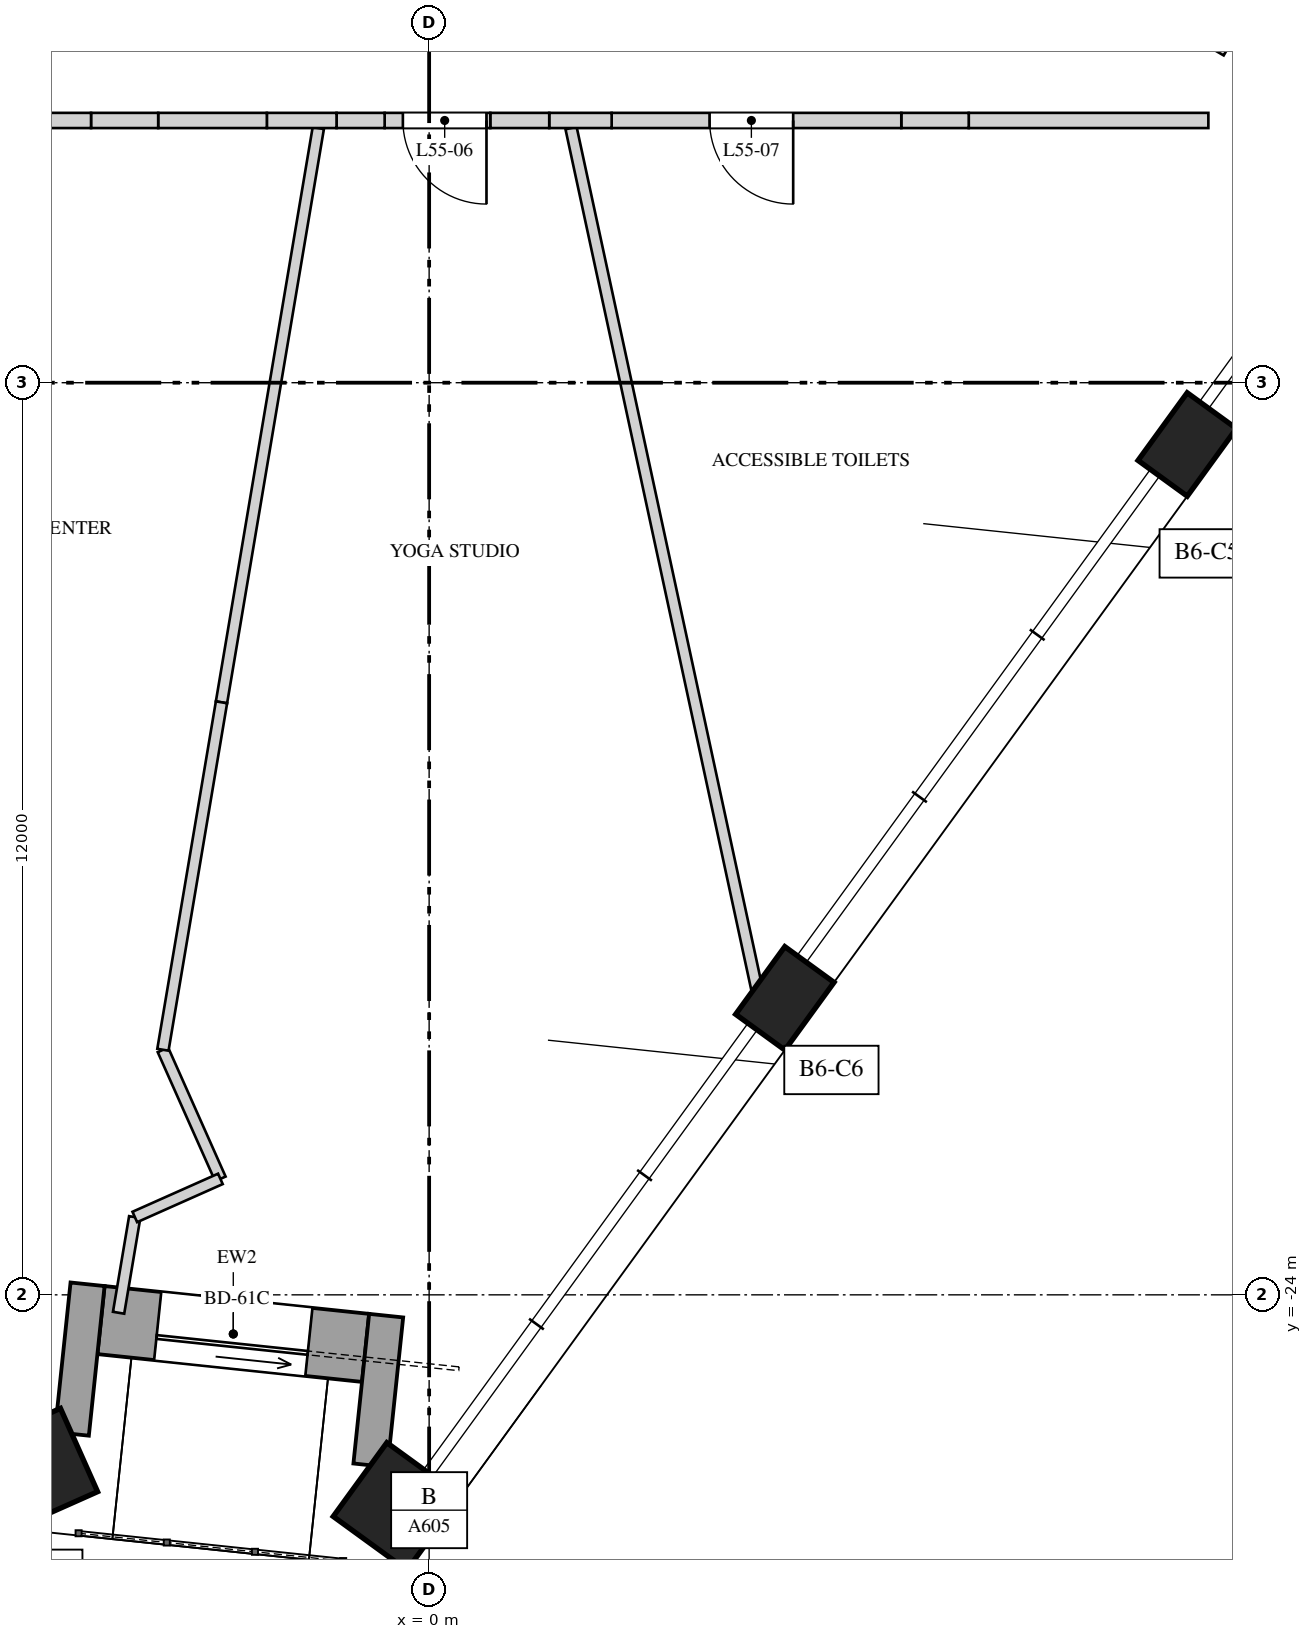
"""IFC4 building model, lengths in metres.
Left out: names, types, materials, properties, quantities, classifications, styles, units other than length and angle.
Written with IfcOpenShell. Run it as: python <this file> out.ifc"""

import sys

from ifc_helpers import new_model, si_unit, direction, frame, frame_2d, origin, origin_2d, place, context, subcontext, project, spatial, polyline, rectangle, outline, extrude, element, fill, save


model = new_model("IFC4")
c1 = context("Model", 3, precision=1e-05, world=origin(), true_north=direction((0.0, 1.0)))
c2 = subcontext(c1, "Body", "Model", "MODEL_VIEW")
j1 = project(units=[si_unit("LENGTHUNIT", "METRE"), si_unit("PLANEANGLEUNIT", "RADIAN")], contexts=[c1])
p1 = place(None, origin())
s1 = spatial("IfcSite", under=j1, at=p1, CompositionType="ELEMENT")
p2 = place(p1, origin())
s2 = spatial("IfcBuilding", under=s1, at=p2, CompositionType="ELEMENT")
p3 = place(p2, frame((0.0, 0.0, 237.2)))
s3 = spatial("IfcBuildingStorey", under=s2, at=p3, CompositionType="ELEMENT", Elevation=237.2)
for number, where, z_axis, x_axis in (
    (1, (-5.154, -26.286, -0.35), (0.0, 0.0, 1.0), (0.407, -0.914, 0.0)),
    (2, (-0.423, -26.783, -0.35), (0.0, 0.0, 1.0), (0.588, 0.809, 0.0)),
):
    element("IfcColumn", number, at=place(p3, frame(where, z_axis=z_axis, x_axis=x_axis)), inside=s3, PredefinedType="COLUMN", context=c2, shape_type="SweptSolid", body=[
        extrude(rectangle(XDim=1.2, YDim=1.2, at=origin_2d()), origin(), (0.0, 0.0, 1.0), 4.35),
    ])
for number, where, z_axis, x_axis in (
    (3, (4.68, -20.099, -0.35), (0.0, 0.0, 1.0), (0.588, 0.809, 0.0)),
    (4, (9.974, -12.813, -0.35), (0.0, 0.0, 1.0), (0.588, 0.809, 0.0)),
):
    element("IfcColumn", number, at=place(p3, frame(where, z_axis=z_axis, x_axis=x_axis)), inside=s3, PredefinedType="COLUMN", context=c2, shape_type="SweptSolid", body=[
        extrude(rectangle(XDim=1.1, YDim=0.8, at=origin_2d()), origin(), (0.0, 0.0, 1.0), 4.35),
    ])
p4 = place(p3, frame((-0.836, -24.698, 0.0), z_axis=(0.0, 0.0, 1.0), x_axis=(-0.994518821828, 0.104557701916, 0.0)))
e5 = element("IfcWall", 5, at=p4, inside=s3, PredefinedType="SOLIDWALL", context=c2, shape_type="SweptSolid", body=[
    extrude(rectangle(XDim=3.5, YDim=0.9, at=frame_2d((1.75, 0.0))), origin(), (0.0, 0.0, 1.0), 3.3),
])
p5 = place(p4, frame((0.75, 0.0, 0.0)))
e6 = element("IfcOpeningElement", 6, at=p5, cuts=e5, PredefinedType="OPENING", context=c2, shape_type="SweptSolid", body=[
    extrude(rectangle(XDim=2.0, YDim=2.4, at=frame_2d((1.0, 1.2))), frame((0.0, 0.46, 0.0), z_axis=(0.0, -1.0, 0.0), x_axis=(1.0, 0.0, 0.0)), (0.0, 0.0, 1.0), 0.92),
])
for number, where, z_axis, x_axis in (
    (7, (-0.772, -26.242, 0.0), (0.0, 0.0, 1.0), (0.104, 0.995, 0.0)),
    (8, (-4.701, -25.829, 0.0), (0.0, 0.0, 1.0), (0.105, 0.995, 0.0)),
):
    element("IfcWall", number, at=place(p3, frame(where, z_axis=z_axis, x_axis=x_axis)), inside=s3, PredefinedType="SOLIDWALL", context=c2, shape_type="SweptSolid", body=[
        extrude(rectangle(XDim=1.979, YDim=0.45, at=frame_2d((0.99, 0.0))), origin(), (0.0, 0.0, 1.0), 2.55),
    ])
p6 = place(p3, frame((-3.873, -22.977, 0.0), z_axis=(0.0, 0.0, 1.0), x_axis=(-0.166260221615, -0.986081912778, 0.0)))
e9 = element("IfcWall", 9, at=p6, inside=s3, PredefinedType="PARTITIONING", context=c2, shape_type="SweptSolid", body=[
    extrude(rectangle(XDim=1.276, YDim=0.15, at=frame_2d((0.638, 0.0))), origin(), (0.0, 0.0, 1.0), 3.65),
])
p7 = place(p3, frame((-3.502, -20.777, 0.0), z_axis=(0.0, 0.0, 1.0), x_axis=(0.40677227382, -0.913529592981, 0.0)))
e10 = element("IfcWall", 10, at=p7, inside=s3, PredefinedType="PARTITIONING", context=c2, shape_type="SweptSolid", body=[
    extrude(rectangle(XDim=1.858, YDim=0.15, at=frame_2d((0.929, 0.0))), origin(), (0.0, 0.0, 1.0), 3.65),
])
p8 = place(p3, frame((-2.746, -22.474, 0.0), z_axis=(0.0, 0.0, 1.0), x_axis=(-0.913500903341, -0.406836698929, 0.0)))
e11 = element("IfcWall", 11, at=p8, inside=s3, PredefinedType="PARTITIONING", context=c2, shape_type="SweptSolid", body=[
    extrude(rectangle(XDim=1.233, YDim=0.15, at=frame_2d((0.616, 0.0))), origin(), (0.0, 0.0, 1.0), 3.65),
])
p9 = place(p3, frame((-1.458, -8.65, 0.0), z_axis=(0.0, 0.0, 1.0), x_axis=(-0.166222927691, -0.986088200066, 0.0)))
e12 = element("IfcWall", 12, at=p9, inside=s3, PredefinedType="PARTITIONING", context=c2, shape_type="SweptSolid", body=[
    extrude(rectangle(XDim=7.661, YDim=0.15, at=frame_2d((3.831, 0.0))), origin(), (0.0, 0.0, 1.0), 2.55),
])
p10 = place(p3, frame((-2.732, -16.205, 0.0), z_axis=(0.0, 0.0, 1.0), x_axis=(-0.166217863251, -0.986089053755, 0.0)))
e13 = element("IfcWall", 13, at=p10, inside=s3, PredefinedType="PARTITIONING", context=c2, shape_type="SweptSolid", body=[
    extrude(rectangle(XDim=4.635, YDim=0.15, at=frame_2d((2.318, 0.0))), origin(), (0.0, 0.0, 1.0), 3.65),
])
p11 = place(p3, frame((1.867, -8.65, 0.0), z_axis=(0.0, 0.0, 1.0), x_axis=(0.211008418271, -0.977484244077, 0.0)))
e14 = element("IfcWall", 14, at=p11, inside=s3, PredefinedType="PARTITIONING", context=c2, shape_type="SweptSolid", body=[
    extrude(rectangle(XDim=11.855, YDim=0.15, at=frame_2d((5.927, 0.0))), origin(), (0.0, 0.0, 1.0), 2.75),
])
p12 = place(p3, frame((12.048, -4.733, 0.0), z_axis=(0.0, 0.0, 1.0), x_axis=(-0.500005339912, -0.866022320763, 0.0)))
e15 = element("IfcWall", 15, at=p12, inside=s3, PredefinedType="SOLIDWALL", context=c2, shape_type="SweptSolid", body=[
    extrude(rectangle(XDim=3.362, YDim=0.2, at=frame_2d((1.681, 0.0))), origin(), (0.0, 0.0, 1.0), 3.65),
])
p13 = place(p3, frame((10.252, -8.55, 0.0), z_axis=(0.0, 0.0, 1.0), x_axis=(-1.0, 0.0, 0.0)))
e16 = element("IfcWall", 16, at=p13, inside=s3, PredefinedType="SOLIDWALL", context=c2, shape_type="SweptSolid", body=[
    extrude(rectangle(XDim=3.153, YDim=0.2, at=frame_2d((1.576, 0.0))), origin(), (0.0, 0.0, 1.0), 3.65),
])
p14 = place(p3, frame((7.099, -8.55, 0.0), z_axis=(0.0, 0.0, 1.0), x_axis=(-1.0, 0.0, 0.0)))
e17 = element("IfcWall", 17, at=p14, inside=s3, PredefinedType="SOLIDWALL", context=c2, shape_type="SweptSolid", body=[
    extrude(rectangle(XDim=0.887, YDim=0.2, at=frame_2d((0.444, 0.0))), origin(), (0.0, 0.0, 1.0), 2.95),
])
p15 = place(p3, frame((6.212, -8.55, 0.0), z_axis=(0.0, 0.0, 1.0), x_axis=(-1.0, 0.0, 0.0)))
e18 = element("IfcWall", 18, at=p15, inside=s3, PredefinedType="SOLIDWALL", context=c2, shape_type="SweptSolid", body=[
    extrude(rectangle(XDim=3.811, YDim=0.2, at=frame_2d((1.905, 0.0))), origin(), (0.0, 0.0, 1.0), 3.65),
])
p16 = place(p15, frame((1.423, 0.0, 0.0)))
e19 = element("IfcOpeningElement", 19, at=p16, cuts=e18, PredefinedType="OPENING", context=c2, shape_type="SweptSolid", body=[
    extrude(rectangle(XDim=1.1, YDim=2.4, at=frame_2d((0.55, 1.2))), frame((0.0, 0.11, 0.0), z_axis=(0.0, -1.0, 0.0), x_axis=(1.0, 0.0, 0.0)), (0.0, 0.0, 1.0), 0.22),
])
p17 = place(p3, frame((2.401, -8.55, 0.0), z_axis=(0.0, 0.0, 1.0), x_axis=(-1.0, 0.0, 0.0)))
e20 = element("IfcWall", 20, at=p17, inside=s3, PredefinedType="SOLIDWALL", context=c2, shape_type="SweptSolid", body=[
    extrude(rectangle(XDim=0.821, YDim=0.2, at=frame_2d((0.411, 0.0))), origin(), (0.0, 0.0, 1.0), 2.75),
])
p18 = place(p3, frame((1.58, -8.55, 0.0), z_axis=(0.0, 0.0, 1.0), x_axis=(-1.0, 0.0, 0.0)))
e21 = element("IfcWall", 21, at=p18, inside=s3, PredefinedType="SOLIDWALL", context=c2, shape_type="SweptSolid", body=[
    extrude(rectangle(XDim=0.776, YDim=0.2, at=frame_2d((0.388, 0.0))), origin(), (0.0, 0.0, 1.0), 3.65),
])
p19 = place(p3, frame((0.804, -8.55, 0.0), z_axis=(0.0, 0.0, 1.0), x_axis=(-1.0, 0.0, 0.0)))
e22 = element("IfcWall", 22, at=p19, inside=s3, PredefinedType="SOLIDWALL", context=c2, shape_type="SweptSolid", body=[
    extrude(outline(polyline([(0.0, 0.0), (1.39, 0.0), (1.39, 2.55), (0.49, 2.55), (0.49, 3.65), (0.0, 3.65), (0.0, 0.0)])), frame((0.0, 0.1, 0.0), z_axis=(0.0, -1.0, 0.0), x_axis=(1.0, 0.0, 0.0)), (0.0, 0.0, 1.0), 0.2),
])
p20 = place(p19, frame((0.05, 0.0, 0.0)))
e23 = element("IfcOpeningElement", 23, at=p20, cuts=e22, PredefinedType="OPENING", context=c2, shape_type="SweptSolid", body=[
    extrude(rectangle(XDim=1.1, YDim=2.4, at=frame_2d((0.55, 1.2))), frame((0.0, 0.11, 0.0), z_axis=(0.0, -1.0, 0.0), x_axis=(1.0, 0.0, 0.0)), (0.0, 0.0, 1.0), 0.22),
])
p21 = place(p3, frame((-0.585, -8.55, 0.0), z_axis=(0.0, 0.0, 1.0), x_axis=(-1.0, 0.0, 0.0)))
e24 = element("IfcWall", 24, at=p21, inside=s3, PredefinedType="SOLIDWALL", context=c2, shape_type="SweptSolid", body=[
    extrude(rectangle(XDim=0.633, YDim=0.2, at=frame_2d((0.316, 0.0))), origin(), (0.0, 0.0, 1.0), 3.65),
])
p22 = place(p3, frame((-1.218, -8.55, 0.0), z_axis=(0.0, 0.0, 1.0), x_axis=(-1.0, 0.0, 0.0)))
e25 = element("IfcWall", 25, at=p22, inside=s3, PredefinedType="SOLIDWALL", context=c2, shape_type="SweptSolid", body=[
    extrude(rectangle(XDim=0.917, YDim=0.2, at=frame_2d((0.458, 0.0))), origin(), (0.0, 0.0, 1.0), 2.55),
])
p23 = place(p3, frame((-2.135, -8.55, 0.0), z_axis=(0.0, 0.0, 1.0), x_axis=(-1.0, 0.0, 0.0)))
e26 = element("IfcWall", 26, at=p23, inside=s3, PredefinedType="SOLIDWALL", context=c2, shape_type="SweptSolid", body=[
    extrude(rectangle(XDim=1.43, YDim=0.2, at=frame_2d((0.715, 0.0))), origin(), (0.0, 0.0, 1.0), 3.65),
])
p24 = place(p3, frame((-3.565, -8.55, 0.0), z_axis=(0.0, 0.0, 1.0), x_axis=(-1.0, 0.0, 0.0)))
e27 = element("IfcWall", 27, at=p24, inside=s3, PredefinedType="SOLIDWALL", context=c2, shape_type="SweptSolid", body=[
    extrude(rectangle(XDim=0.883, YDim=0.2, at=frame_2d((0.442, 0.0))), origin(), (0.0, 0.0, 1.0), 2.75),
])
p25 = place(p3, frame((-4.448, -8.55, 0.0), z_axis=(0.0, 0.0, 1.0), x_axis=(-1.0, 0.0, 0.0)))
e28 = element("IfcWall", 28, at=p25, inside=s3, PredefinedType="SOLIDWALL", context=c2, shape_type="SweptSolid", body=[
    extrude(rectangle(XDim=5.161, YDim=0.2, at=frame_2d((2.581, 0.0))), origin(), (0.0, 0.0, 1.0), 3.65),
])
p26 = place(p25, frame((0.572, 0.0, 0.0)))
e29 = element("IfcOpeningElement", 29, at=p26, cuts=e28, PredefinedType="OPENING", context=c2, shape_type="SweptSolid", body=[
    extrude(rectangle(XDim=1.1, YDim=2.4, at=frame_2d((0.55, 1.2))), frame((0.0, 0.11, 0.0), z_axis=(0.0, -1.0, 0.0), x_axis=(1.0, 0.0, 0.0)), (0.0, 0.0, 1.0), 0.22),
])
p27 = place(p5, origin())
e30 = element("IfcDoor", 30, at=p27, inside=s3, OperationType="SLIDING_TO_LEFT", PredefinedType="DOOR", context=c2, shape_type="SweptSolid", body=[
    extrude(rectangle(XDim=2.0, YDim=2.4, at=frame_2d((1.0, 1.2))), frame((0.0, 0.025, 0.0), z_axis=(0.0, -1.0, 0.0), x_axis=(1.0, 0.0, 0.0)), (0.0, 0.0, 1.0), 0.05),
])
fill(e6, e30)
p28 = place(p20, origin())
e31 = element("IfcDoor", 31, at=p28, inside=s3, OperationType="SINGLE_SWING_RIGHT", PredefinedType="DOOR", context=c2, shape_type="SweptSolid", body=[
    extrude(rectangle(XDim=1.1, YDim=2.4, at=frame_2d((0.55, 1.2))), frame((0.0, 0.025, 0.0), z_axis=(0.0, -1.0, 0.0), x_axis=(1.0, 0.0, 0.0)), (0.0, 0.0, 1.0), 0.05),
])
fill(e23, e31)
p29 = place(p16, origin())
e32 = element("IfcDoor", 32, at=p29, inside=s3, OperationType="SINGLE_SWING_LEFT", PredefinedType="DOOR", context=c2, shape_type="SweptSolid", body=[
    extrude(rectangle(XDim=1.1, YDim=2.4, at=frame_2d((0.55, 1.2))), frame((0.0, 0.025, 0.0), z_axis=(0.0, -1.0, 0.0), x_axis=(1.0, 0.0, 0.0)), (0.0, 0.0, 1.0), 0.05),
])
fill(e19, e32)
save(model, sys.argv[1])
